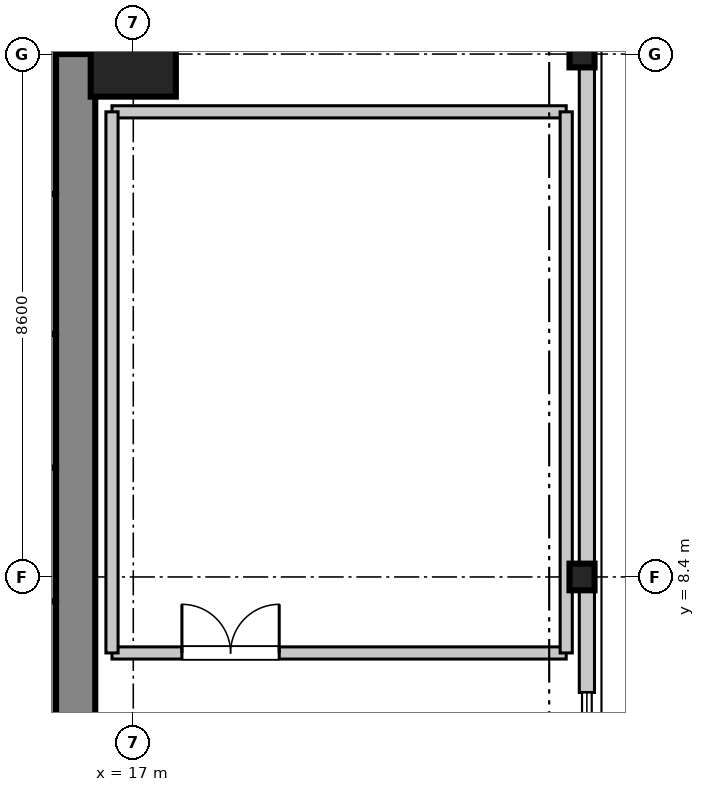
"""IFC4 building model, lengths in metres.
Left out: names, types, materials, properties, quantities, classifications, styles, units other than length and angle.
Written with IfcOpenShell. Run it as: python <this file> out.ifc"""

import sys

from ifc_helpers import new_model, si_unit, direction, frame, frame_2d, origin, origin_2d, place, context, subcontext, project, spatial, rectangle, i_section, extrude, source, transform, mapped, element, fill, save


model = new_model("IFC4")
c1 = context("Model", 3, precision=1e-05, world=origin(), true_north=direction((0.0, 1.0)))
c2 = subcontext(c1, "Body", "Model", "MODEL_VIEW")
j1 = project(units=[si_unit("LENGTHUNIT", "METRE"), si_unit("PLANEANGLEUNIT", "RADIAN")], contexts=[c1])
p1 = place(None, origin())
s1 = spatial("IfcSite", under=j1, at=p1, CompositionType="ELEMENT")
p2 = place(p1, origin())
s2 = spatial("IfcBuilding", under=s1, at=p2, CompositionType="ELEMENT")
p3 = place(p2, frame((0.0, 0.0, 83.5)))
s3 = spatial("IfcBuildingStorey", under=s2, at=p3, CompositionType="ELEMENT", Elevation=83.5)
m1 = source(origin(), c2, "Body", "SweptSolid", [
    extrude(rectangle(XDim=1.4, YDim=1.4, at=origin_2d()), origin(), (0.0, 0.0, 1.0), 4.755),
])
p4 = place(p3, frame((17.0, 17.0, 0.0), z_axis=(0.0, 0.0, 1.0), x_axis=(1.0, 0.0, 0.0)))
e1 = element("IfcColumn", 1, at=p4, inside=s3, PredefinedType="COLUMN", context=c2, shape_type="MappedRepresentation", body=[
    mapped(m1, transform((0.0, 0.0, 0.0), scale=1.0)),
])
m2 = source(origin(), c2, "Body", "SweptSolid", [
    extrude(i_section(OverallWidth=0.412, OverallDepth=0.438, WebThickness=0.023, FlangeThickness=0.036, at=origin_2d()), origin(), (0.0, 0.0, 1.0), 4.694),
])
for number, where, z_axis, x_axis in (
    (2, (24.38, 8.4, 0.0), (-0.128, 0.0, 0.992), (0.0, -1.0, 0.0)),
    (3, (24.38, 17.0, 0.0), (-0.128, 0.0, 0.992), (0.0, -1.0, 0.0)),
):
    element("IfcColumn", number, at=place(p3, frame(where, z_axis=z_axis, x_axis=x_axis)), inside=s3, PredefinedType="COLUMN", context=c2, shape_type="MappedRepresentation", body=[
        mapped(m2, transform((0.0, 0.0, 0.0), scale=1.0)),
    ])
m3 = source(origin(), c2, "Body", "SweptSolid", [
    extrude(rectangle(XDim=11.6, YDim=0.65, at=frame_2d((5.8, 0.0))), origin(), (0.0, 0.0, 1.0), 4.53),
])
p5 = place(p3, frame((16.05, 5.4, 0.0), z_axis=(0.0, 0.0, 1.0), x_axis=(0.0, 1.0, 0.0)))
e4 = element("IfcWall", 4, at=p5, inside=s3, PredefinedType="SHEAR", context=c2, shape_type="MappedRepresentation", body=[
    mapped(m3, transform((0.0, 0.0, 0.0), scale=1.0)),
])
m4 = source(origin(), c2, "Body", "SweptSolid", [
    extrude(rectangle(XDim=2.36, YDim=0.22, at=frame_2d((1.18, 0.0))), origin(), (0.0, 0.0, 1.0), 4.53),
])
p6 = place(p3, frame((15.62, 5.64, 0.0), z_axis=(0.0, 0.0, 1.0), x_axis=(0.0, 1.0, 0.0)))
e5 = element("IfcWall", 5, at=p6, inside=s3, PredefinedType="SHEAR", context=c2, shape_type="MappedRepresentation", body=[
    mapped(m4, transform((0.0, 0.0, 0.0), scale=1.0)),
])
m5 = source(origin(), c2, "Body", "SweptSolid", [
    extrude(rectangle(XDim=2.2, YDim=0.22, at=frame_2d((1.1, 0.0))), origin(), (0.0, 0.0, 1.0), 4.53),
])
for number, where, z_axis, x_axis in (
    (6, (15.62, 8.0, 0.0), (0.0, 0.0, 1.0), (0.0, 1.0, 0.0)),
    (7, (15.62, 10.2, 0.0), (0.0, 0.0, 1.0), (0.0, 1.0, 0.0)),
):
    element("IfcWall", number, at=place(p3, frame(where, z_axis=z_axis, x_axis=x_axis)), inside=s3, PredefinedType="SHEAR", context=c2, shape_type="MappedRepresentation", body=[
        mapped(m5, transform((0.0, 0.0, 0.0), scale=1.0)),
    ])
m6 = source(origin(), c2, "Body", "SweptSolid", [
    extrude(rectangle(XDim=2.3, YDim=0.22, at=frame_2d((1.15, 0.0))), origin(), (0.0, 0.0, 1.0), 4.53),
])
p7 = place(p3, frame((15.62, 12.4, 0.0), z_axis=(0.0, 0.0, 1.0), x_axis=(0.0, 1.0, 0.0)))
e8 = element("IfcWall", 8, at=p7, inside=s3, PredefinedType="SHEAR", context=c2, shape_type="MappedRepresentation", body=[
    mapped(m6, transform((0.0, 0.0, 0.0), scale=1.0)),
])
m7 = source(origin(), c2, "Body", "SweptSolid", [
    extrude(rectangle(XDim=2.61, YDim=0.22, at=frame_2d((1.305, 0.0))), origin(), (0.0, 0.0, 1.0), 4.53),
])
p8 = place(p3, frame((15.62, 14.7, 0.0), z_axis=(0.0, 0.0, 1.0), x_axis=(0.0, 1.0, 0.0)))
e9 = element("IfcWall", 9, at=p8, inside=s3, PredefinedType="SHEAR", context=c2, shape_type="MappedRepresentation", body=[
    mapped(m7, transform((0.0, 0.0, 0.0), scale=1.0)),
])
m8 = source(origin(), c2, "Body", "SweptSolid", [
    extrude(rectangle(XDim=15.16, YDim=0.25, at=frame_2d((7.58, 0.0))), origin(), (0.0, 0.0, 1.0), 4.01),
])
p9 = place(p3, frame((24.46, 6.5, 0.0), z_axis=(0.0, 0.0, 1.0), x_axis=(0.0, 1.0, 0.0)))
e10 = element("IfcWall", 10, at=p9, inside=s3, PredefinedType="STANDARD", context=c2, shape_type="MappedRepresentation", body=[
    mapped(m8, transform((0.0, 0.0, 0.0), scale=1.0)),
])
m9 = source(origin(), c2, "Body", "SweptSolid", [
    extrude(rectangle(XDim=7.47, YDim=0.2, at=frame_2d((3.735, 0.0))), origin(), (0.0, 0.0, 1.0), 3.4),
])
p10 = place(p3, frame((16.65, 7.15, 0.0), z_axis=(0.0, 0.0, 1.0), x_axis=(1.0, 0.0, 0.0)))
e11 = element("IfcWall", 11, at=p10, inside=s3, PredefinedType="PARTITIONING", context=c2, shape_type="MappedRepresentation", body=[
    mapped(m9, transform((0.0, 0.0, 0.0), scale=1.0)),
])
p11 = place(p10, frame((1.15, 0.0, 0.0)))
e12 = element("IfcOpeningElement", 12, at=p11, cuts=e11, PredefinedType="OPENING", context=c2, shape_type="SweptSolid", body=[
    extrude(rectangle(XDim=1.6, YDim=2.15, at=frame_2d((0.8, 1.075))), frame((0.0, 0.11, 0.0), z_axis=(0.0, -1.0, 0.0), x_axis=(1.0, 0.0, 0.0)), (0.0, 0.0, 1.0), 0.22),
])
p12 = place(p3, frame((16.65, 16.05, 0.0), z_axis=(0.0, 0.0, 1.0), x_axis=(1.0, 0.0, 0.0)))
e13 = element("IfcWall", 13, at=p12, inside=s3, PredefinedType="PARTITIONING", context=c2, shape_type="MappedRepresentation", body=[
    mapped(m9, transform((0.0, 0.0, 0.0), scale=1.0)),
])
m10 = source(origin(), c2, "Body", "SweptSolid", [
    extrude(rectangle(XDim=8.9, YDim=0.2, at=frame_2d((4.45, 0.0))), origin(), (0.0, 0.0, 1.0), 3.4),
])
for number, where, z_axis, x_axis in (
    (14, (16.65, 7.15, 0.0), (0.0, 0.0, 1.0), (0.0, 1.0, 0.0)),
    (15, (24.12, 7.15, 0.0), (0.0, 0.0, 1.0), (0.0, 1.0, 0.0)),
):
    element("IfcWall", number, at=place(p3, frame(where, z_axis=z_axis, x_axis=x_axis)), inside=s3, PredefinedType="PARTITIONING", context=c2, shape_type="MappedRepresentation", body=[
        mapped(m10, transform((0.0, 0.0, 0.0), scale=1.0)),
    ])
m11 = source(origin(), c2, "Body", "SweptSolid", [
    extrude(rectangle(XDim=1.6, YDim=2.15, at=frame_2d((0.8, 1.075))), frame((0.0, 0.025, 0.0), z_axis=(0.0, -1.0, 0.0), x_axis=(1.0, 0.0, 0.0)), (0.0, 0.0, 1.0), 0.05),
])
p13 = place(p11, origin())
e16 = element("IfcDoor", 16, at=p13, inside=s3, OperationType="DOUBLE_DOOR_SINGLE_SWING", PredefinedType="DOOR", context=c2, shape_type="MappedRepresentation", body=[
    mapped(m11, transform((0.0, 0.0, 0.0), scale=1.0)),
])
fill(e12, e16)
save(model, sys.argv[1])
